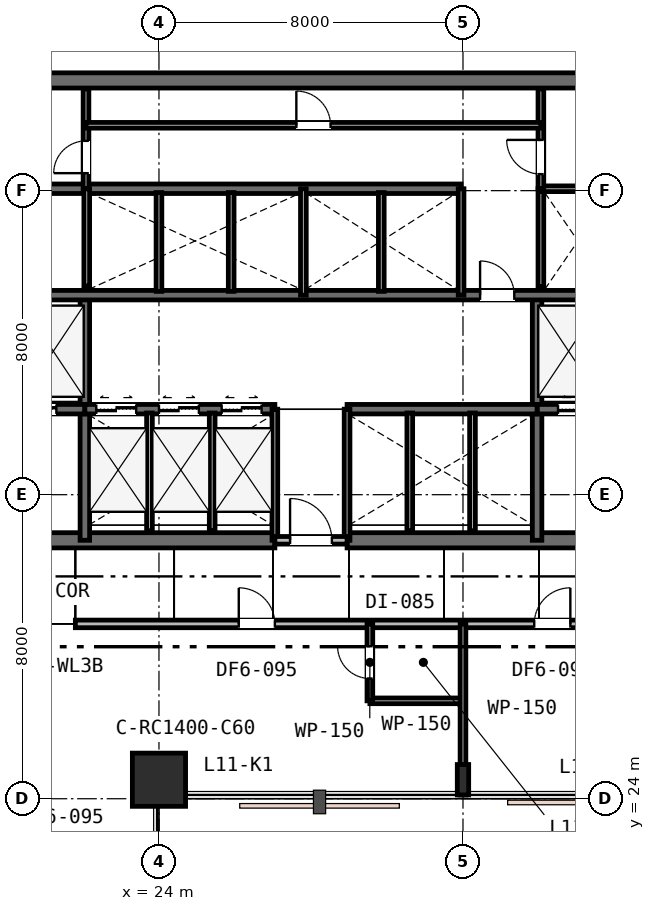
"""IFC4 building model, lengths in metres.
Left out: names, types, materials, properties, quantities, classifications, styles, units other than length and angle.
Written with IfcOpenShell. Run it as: python <this file> out.ifc"""

import sys

from ifc_helpers import new_model, si_unit, direction, frame, frame_2d, origin, origin_2d, place, context, subcontext, project, spatial, rectangle, i_section, extrude, element, fill, save


model = new_model("IFC4")
c1 = context("Model", 3, precision=1e-05, world=origin(), true_north=direction((0.0, 1.0)))
c2 = subcontext(c1, "Body", "Model", "MODEL_VIEW")
j1 = project(units=[si_unit("LENGTHUNIT", "METRE"), si_unit("PLANEANGLEUNIT", "RADIAN")], contexts=[c1])
p1 = place(None, origin())
s1 = spatial("IfcSite", under=j1, at=p1, CompositionType="ELEMENT")
p2 = place(p1, origin())
s2 = spatial("IfcBuilding", under=s1, at=p2, CompositionType="ELEMENT")
p3 = place(p2, frame((0.0, 0.0, 47.4)))
s3 = spatial("IfcBuildingStorey", under=s2, at=p3, CompositionType="ELEMENT", Elevation=47.4)
p4 = place(p3, frame((15.85, 42.9, 0.0), z_axis=(0.0, 0.0, 1.0), x_axis=(1.0, 0.0, 0.0)))
e1 = element("IfcWall", 1, at=p4, inside=s3, PredefinedType="SHEAR", context=c2, shape_type="SweptSolid", body=[
    extrude(rectangle(XDim=24.3, YDim=0.4, at=frame_2d((12.15, 0.0))), origin(), (0.0, 0.0, 1.0), 3.6),
])
p5 = place(p3, frame((15.85, 30.8, 0.0), z_axis=(0.0, 0.0, 1.0), x_axis=(1.0, 0.0, 0.0)))
e2 = element("IfcWall", 2, at=p5, inside=s3, PredefinedType="SHEAR", context=c2, shape_type="SweptSolid", body=[
    extrude(rectangle(XDim=11.2, YDim=0.4, at=frame_2d((5.6, 0.0))), origin(), (0.0, 0.0, 1.0), 3.6),
])
p6 = place(p5, frame((2.45, 0.0, 0.0)))
e3 = element("IfcOpeningElement", 3, at=p6, cuts=e2, PredefinedType="OPENING", context=c2, shape_type="SweptSolid", body=[
    extrude(rectangle(XDim=1.1, YDim=2.15, at=frame_2d((0.55, 1.075))), frame((0.0, 0.21, 0.0), z_axis=(0.0, -1.0, 0.0), x_axis=(1.0, 0.0, 0.0)), (0.0, 0.0, 1.0), 0.42),
])
p7 = place(p3, frame((28.95, 30.8, 0.0), z_axis=(0.0, 0.0, 1.0), x_axis=(1.0, 0.0, 0.0)))
e4 = element("IfcWall", 4, at=p7, inside=s3, PredefinedType="SHEAR", context=c2, shape_type="SweptSolid", body=[
    extrude(rectangle(XDim=11.2, YDim=0.4, at=frame_2d((5.6, 0.0))), origin(), (0.0, 0.0, 1.0), 3.6),
])
p8 = place(p7, frame((7.65, 0.0, 0.0)))
e5 = element("IfcOpeningElement", 5, at=p8, cuts=e4, PredefinedType="OPENING", context=c2, shape_type="SweptSolid", body=[
    extrude(rectangle(XDim=1.1, YDim=2.15, at=frame_2d((0.55, 1.075))), frame((0.0, 0.21, 0.0), z_axis=(0.0, -1.0, 0.0), x_axis=(1.0, 0.0, 0.0)), (0.0, 0.0, 1.0), 0.42),
])
for number, where, z_axis, x_axis in (
    (6, (22.05, 30.8, 0.0), (0.0, 0.0, 1.0), (0.0, 1.0, 0.0)),
    (7, (33.95, 30.8, 0.0), (0.0, 0.0, 1.0), (0.0, 1.0, 0.0)),
):
    element("IfcWall", number, at=place(p3, frame(where, z_axis=z_axis, x_axis=x_axis)), inside=s3, PredefinedType="SHEAR", context=c2, shape_type="SweptSolid", body=[
        extrude(rectangle(XDim=6.45, YDim=0.25, at=frame_2d((3.225, 0.0))), origin(), (0.0, 0.0, 1.0), 3.6),
    ])
p9 = place(p3, frame((16.0, 34.25, 0.0), z_axis=(0.0, 0.0, 1.0), x_axis=(1.0, 0.0, 0.0)))
e8 = element("IfcWall", 8, at=p9, inside=s3, PredefinedType="SHEAR", context=c2, shape_type="SweptSolid", body=[
    extrude(rectangle(XDim=6.05, YDim=0.25, at=frame_2d((3.025, 0.0))), origin(), (0.0, 0.0, 1.0), 3.6),
])
p10 = place(p9, frame((1.25, 0.0, 0.0)))
e9 = element("IfcOpeningElement", 9, at=p10, cuts=e8, PredefinedType="OPENING", context=c2, shape_type="SweptSolid", body=[
    extrude(rectangle(XDim=1.0, YDim=2.15, at=frame_2d((0.5, 1.075))), frame((0.0, 0.135, 0.0), z_axis=(0.0, -1.0, 0.0), x_axis=(1.0, 0.0, 0.0)), (0.0, 0.0, 1.0), 0.27),
])
p11 = place(p9, frame((4.2, 0.0, 0.0)))
e10 = element("IfcOpeningElement", 10, at=p11, cuts=e8, PredefinedType="OPENING", context=c2, shape_type="SweptSolid", body=[
    extrude(rectangle(XDim=1.1, YDim=2.15, at=frame_2d((0.55, 1.075))), frame((0.0, 0.135, 0.0), z_axis=(0.0, -1.0, 0.0), x_axis=(1.0, 0.0, 0.0)), (0.0, 0.0, 1.0), 0.27),
])
p12 = place(p3, frame((33.95, 34.25, 0.0), z_axis=(0.0, 0.0, 1.0), x_axis=(1.0, 0.0, 0.0)))
e11 = element("IfcWall", 11, at=p12, inside=s3, PredefinedType="SHEAR", context=c2, shape_type="SweptSolid", body=[
    extrude(rectangle(XDim=6.05, YDim=0.25, at=frame_2d((3.025, 0.0))), origin(), (0.0, 0.0, 1.0), 3.6),
])
p13 = place(p12, frame((3.7, 0.0, 0.0)))
e12 = element("IfcOpeningElement", 12, at=p13, cuts=e11, PredefinedType="OPENING", context=c2, shape_type="SweptSolid", body=[
    extrude(rectangle(XDim=1.0, YDim=2.15, at=frame_2d((0.5, 1.075))), frame((0.0, 0.135, 0.0), z_axis=(0.0, -1.0, 0.0), x_axis=(1.0, 0.0, 0.0)), (0.0, 0.0, 1.0), 0.27),
])
p14 = place(p12, frame((0.55, 0.0, 0.0)))
e13 = element("IfcOpeningElement", 13, at=p14, cuts=e11, PredefinedType="OPENING", context=c2, shape_type="SweptSolid", body=[
    extrude(rectangle(XDim=1.1, YDim=2.15, at=frame_2d((0.55, 1.075))), frame((0.0, 0.135, 0.0), z_axis=(0.0, -1.0, 0.0), x_axis=(1.0, 0.0, 0.0)), (0.0, 0.0, 1.0), 0.27),
])
p15 = place(p3, frame((22.05, 34.25, 0.0), z_axis=(0.0, 0.0, 1.0), x_axis=(1.0, 0.0, 0.0)))
e14 = element("IfcWall", 14, at=p15, inside=s3, PredefinedType="SHEAR", context=c2, shape_type="SweptSolid", body=[
    extrude(rectangle(XDim=5.0, YDim=0.25, at=frame_2d((2.5, 0.0))), origin(), (0.0, 0.0, 1.0), 3.6),
])
p16 = place(p15, frame((0.3, 0.0, 0.0)))
e15 = element("IfcOpeningElement", 15, at=p16, cuts=e14, PredefinedType="OPENING", context=c2, shape_type="SweptSolid", body=[
    extrude(rectangle(XDim=1.05, YDim=2.15, at=frame_2d((0.525, 1.075))), frame((0.0, 0.135, 0.0), z_axis=(0.0, -1.0, 0.0), x_axis=(1.0, 0.0, 0.0)), (0.0, 0.0, 1.0), 0.27),
])
p17 = place(p15, frame((1.95, 0.0, 0.0)))
e16 = element("IfcOpeningElement", 16, at=p17, cuts=e14, PredefinedType="OPENING", context=c2, shape_type="SweptSolid", body=[
    extrude(rectangle(XDim=1.05, YDim=2.15, at=frame_2d((0.525, 1.075))), frame((0.0, 0.135, 0.0), z_axis=(0.0, -1.0, 0.0), x_axis=(1.0, 0.0, 0.0)), (0.0, 0.0, 1.0), 0.27),
])
p18 = place(p15, frame((3.6, 0.0, 0.0)))
e17 = element("IfcOpeningElement", 17, at=p18, cuts=e14, PredefinedType="OPENING", context=c2, shape_type="SweptSolid", body=[
    extrude(rectangle(XDim=1.05, YDim=2.15, at=frame_2d((0.525, 1.075))), frame((0.0, 0.135, 0.0), z_axis=(0.0, -1.0, 0.0), x_axis=(1.0, 0.0, 0.0)), (0.0, 0.0, 1.0), 0.27),
])
p19 = place(p3, frame((28.95, 34.25, 0.0), z_axis=(0.0, 0.0, 1.0), x_axis=(1.0, 0.0, 0.0)))
e18 = element("IfcWall", 18, at=p19, inside=s3, PredefinedType="SHEAR", context=c2, shape_type="SweptSolid", body=[
    extrude(rectangle(XDim=5.0, YDim=0.25, at=frame_2d((2.5, 0.0))), origin(), (0.0, 0.0, 1.0), 3.6),
])
p20 = place(p3, frame((19.9, 37.25, 0.0), z_axis=(0.0, 0.0, 1.0), x_axis=(1.0, 0.0, 0.0)))
e19 = element("IfcWall", 19, at=p20, inside=s3, PredefinedType="SHEAR", context=c2, shape_type="SweptSolid", body=[
    extrude(rectangle(XDim=16.2, YDim=0.25, at=frame_2d((8.1, 0.0))), origin(), (0.0, 0.0, 1.0), 3.6),
])
p21 = place(p20, frame((12.55, 0.0, 0.0)))
e20 = element("IfcOpeningElement", 20, at=p21, cuts=e19, PredefinedType="OPENING", context=c2, shape_type="SweptSolid", body=[
    extrude(rectangle(XDim=0.9, YDim=2.15, at=frame_2d((0.45, 1.075))), frame((0.0, 0.135, 0.0), z_axis=(0.0, -1.0, 0.0), x_axis=(1.0, 0.0, 0.0)), (0.0, 0.0, 1.0), 0.27),
])
p22 = place(p3, frame((19.9, 40.05, 0.0), z_axis=(0.0, 0.0, 1.0), x_axis=(1.0, 0.0, 0.0)))
e21 = element("IfcWall", 21, at=p22, inside=s3, PredefinedType="SHEAR", context=c2, shape_type="SweptSolid", body=[
    extrude(rectangle(XDim=12.05, YDim=0.25, at=frame_2d((6.025, 0.0))), origin(), (0.0, 0.0, 1.0), 3.6),
])
p23 = place(p3, frame((24.0, 24.5, 0.0), z_axis=(0.0, 0.0, 1.0), x_axis=(1.0, 0.0, 0.0)))
e22 = element("IfcColumn", 22, at=p23, inside=s3, PredefinedType="COLUMN", context=c2, shape_type="SweptSolid", body=[
    extrude(rectangle(XDim=1.4, YDim=1.4, at=origin_2d()), origin(), (0.0, 0.0, 1.0), 3.6),
])
p24 = place(p3, frame((32.0, 24.5, 0.0), z_axis=(0.0, 0.0, 1.0), x_axis=(1.0, 0.0, 0.0)))
e23 = element("IfcColumn", 23, at=p24, inside=s3, PredefinedType="COLUMN", context=c2, shape_type="SweptSolid", body=[
    extrude(i_section(OverallWidth=0.3, OverallDepth=0.8, WebThickness=0.018, FlangeThickness=0.033, FilletRadius=0.03, at=origin_2d()), origin(), (0.0, 0.0, 1.0), 3.6),
])
for number, where, z_axis, x_axis in (
    (24, (27.05, 30.8, 0.0), (0.0, 0.0, 1.0), (0.0, 1.0, 0.0)),
    (25, (28.95, 30.8, 0.0), (0.0, 0.0, 1.0), (0.0, 1.0, 0.0)),
):
    element("IfcWall", number, at=place(p3, frame(where, z_axis=z_axis, x_axis=x_axis)), inside=s3, PredefinedType="PLUMBINGWALL", context=c2, shape_type="SweptSolid", body=[
        extrude(rectangle(XDim=3.45, YDim=0.15, at=frame_2d((1.725, 0.0))), origin(), (0.0, 0.0, 1.0), 3.33),
    ])
p25 = place(p3, frame((27.05, 30.8, 0.0), z_axis=(0.0, 0.0, 1.0), x_axis=(1.0, 0.0, 0.0)))
e26 = element("IfcWall", 26, at=p25, inside=s3, PredefinedType="PARTITIONING", context=c2, shape_type="SweptSolid", body=[
    extrude(rectangle(XDim=1.9, YDim=0.2, at=frame_2d((0.95, 0.0))), origin(), (0.0, 0.0, 1.0), 3.33),
])
p26 = place(p25, frame((0.4, 0.0, 0.0)))
e27 = element("IfcOpeningElement", 27, at=p26, cuts=e26, PredefinedType="OPENING", context=c2, shape_type="SweptSolid", body=[
    extrude(rectangle(XDim=1.1, YDim=2.15, at=frame_2d((0.55, 1.075))), frame((0.0, 0.11, 0.0), z_axis=(0.0, -1.0, 0.0), x_axis=(1.0, 0.0, 0.0)), (0.0, 0.0, 1.0), 0.22),
])
for number, where, z_axis, x_axis in (
    (28, (23.75, 31.05, 0.0), (0.0, 0.0, 1.0), (0.0, 1.0, 0.0)),
    (29, (25.4, 31.05, 0.0), (0.0, 0.0, 1.0), (0.0, 1.0, 0.0)),
    (30, (30.6, 31.05, 0.0), (0.0, 0.0, 1.0), (0.0, 1.0, 0.0)),
    (31, (32.25, 31.05, 0.0), (0.0, 0.0, 1.0), (0.0, 1.0, 0.0)),
):
    element("IfcWall", number, at=place(p3, frame(where, z_axis=z_axis, x_axis=x_axis)), inside=s3, PredefinedType="PLUMBINGWALL", context=c2, shape_type="SweptSolid", body=[
        extrude(rectangle(XDim=3.1, YDim=0.15, at=frame_2d((1.55, 0.0))), origin(), (0.0, 0.0, 1.0), 3.33),
    ])
p27 = place(p3, frame((22.1, 37.49, 0.0), z_axis=(0.0, 0.0, 1.0), x_axis=(0.0, 1.0, 0.0)))
e32 = element("IfcWall", 32, at=p27, inside=s3, PredefinedType="PLUMBINGWALL", context=c2, shape_type="SweptSolid", body=[
    extrude(rectangle(XDim=2.56, YDim=0.15, at=frame_2d((1.28, 0.0))), origin(), (0.0, 0.0, 1.0), 3.33),
])
p28 = place(p3, frame((27.8, 37.25, 0.0), z_axis=(0.0, 0.0, 1.0), x_axis=(0.0, 1.0, 0.0)))
e33 = element("IfcWall", 33, at=p28, inside=s3, PredefinedType="PLUMBINGWALL", context=c2, shape_type="SweptSolid", body=[
    extrude(rectangle(XDim=2.8, YDim=0.15, at=frame_2d((1.4, 0.0))), origin(), (0.0, 0.0, 1.0), 3.33),
])
for number, where, z_axis, x_axis in (
    (34, (24.0, 37.35, 0.0), (0.0, 0.0, 1.0), (0.0, 1.0, 0.0)),
    (35, (25.9, 37.35, 0.0), (0.0, 0.0, 1.0), (0.0, 1.0, 0.0)),
):
    element("IfcWall", number, at=place(p3, frame(where, z_axis=z_axis, x_axis=x_axis)), inside=s3, PredefinedType="PLUMBINGWALL", context=c2, shape_type="SweptSolid", body=[
        extrude(rectangle(XDim=2.6, YDim=0.15, at=frame_2d((1.3, 0.0))), origin(), (0.0, 0.0, 1.0), 3.33),
    ])
p29 = place(p3, frame((31.95, 37.25, 0.0), z_axis=(0.0, 0.0, 1.0), x_axis=(0.0, 1.0, 0.0)))
e36 = element("IfcWall", 36, at=p29, inside=s3, PredefinedType="PLUMBINGWALL", context=c2, shape_type="SweptSolid", body=[
    extrude(rectangle(XDim=2.8, YDim=0.15, at=frame_2d((1.4, 0.0))), origin(), (0.0, 0.0, 1.0), 3.33),
])
p30 = place(p3, frame((29.85, 37.35, 0.0), z_axis=(0.0, 0.0, 1.0), x_axis=(0.0, 1.0, 0.0)))
e37 = element("IfcWall", 37, at=p30, inside=s3, PredefinedType="PLUMBINGWALL", context=c2, shape_type="SweptSolid", body=[
    extrude(rectangle(XDim=2.6, YDim=0.15, at=frame_2d((1.3, 0.0))), origin(), (0.0, 0.0, 1.0), 3.33),
])
p31 = place(p3, frame((34.05, 37.473, 0.0), z_axis=(0.0, 0.0, 1.0), x_axis=(0.0, 1.0, 0.0)))
e38 = element("IfcWall", 38, at=p31, inside=s3, PredefinedType="PLUMBINGWALL", context=c2, shape_type="SweptSolid", body=[
    extrude(rectangle(XDim=2.577, YDim=0.15, at=frame_2d((1.288, 0.0))), origin(), (0.0, 0.0, 1.0), 3.33),
])
p32 = place(p3, frame((34.05, 40.05, 0.0), z_axis=(0.0, 0.0, 1.0), x_axis=(1.0, 0.0, 0.0)))
e39 = element("IfcWall", 39, at=p32, inside=s3, PredefinedType="PARTITIONING", context=c2, shape_type="SweptSolid", body=[
    extrude(rectangle(XDim=2.05, YDim=0.15, at=frame_2d((1.025, 0.0))), origin(), (0.0, 0.0, 1.0), 3.33),
])
p33 = place(p3, frame((34.05, 40.05, 0.0), z_axis=(0.0, 0.0, 1.0), x_axis=(0.0, 1.0, 0.0)))
e40 = element("IfcWall", 40, at=p33, inside=s3, PredefinedType="PARTITIONING", context=c2, shape_type="SweptSolid", body=[
    extrude(rectangle(XDim=2.63, YDim=0.15, at=frame_2d((1.315, 0.0))), origin(), (0.0, 0.0, 1.0), 3.33),
])
p34 = place(p33, frame((0.385, 0.0, 0.0)))
e41 = element("IfcOpeningElement", 41, at=p34, cuts=e40, PredefinedType="OPENING", context=c2, shape_type="SweptSolid", body=[
    extrude(rectangle(XDim=0.9, YDim=2.15, at=frame_2d((0.45, 1.075))), frame((0.0, 0.085, 0.0), z_axis=(0.0, -1.0, 0.0), x_axis=(1.0, 0.0, 0.0)), (0.0, 0.0, 1.0), 0.17),
])
p35 = place(p3, frame((22.08, 40.05, 0.0), z_axis=(0.0, 0.0, 1.0), x_axis=(0.0, 1.0, 0.0)))
e42 = element("IfcWall", 42, at=p35, inside=s3, PredefinedType="PARTITIONING", context=c2, shape_type="SweptSolid", body=[
    extrude(rectangle(XDim=2.63, YDim=0.15, at=frame_2d((1.315, 0.0))), origin(), (0.0, 0.0, 1.0), 3.33),
])
p36 = place(p35, frame((0.41, 0.0, 0.0)))
e43 = element("IfcOpeningElement", 43, at=p36, cuts=e42, PredefinedType="OPENING", context=c2, shape_type="SweptSolid", body=[
    extrude(rectangle(XDim=0.85, YDim=2.15, at=frame_2d((0.425, 1.075))), frame((0.0, 0.085, 0.0), z_axis=(0.0, -1.0, 0.0), x_axis=(1.0, 0.0, 0.0)), (0.0, 0.0, 1.0), 0.17),
])
p37 = place(p3, frame((22.08, 41.72, 0.0), z_axis=(0.0, 0.0, 1.0), x_axis=(1.0, 0.0, 0.0)))
e44 = element("IfcWall", 44, at=p37, inside=s3, PredefinedType="PARTITIONING", context=c2, shape_type="SweptSolid", body=[
    extrude(rectangle(XDim=11.97, YDim=0.15, at=frame_2d((5.985, 0.0))), origin(), (0.0, 0.0, 1.0), 3.33),
])
p38 = place(p37, frame((5.535, 0.0, 0.0)))
e45 = element("IfcOpeningElement", 45, at=p38, cuts=e44, PredefinedType="OPENING", context=c2, shape_type="SweptSolid", body=[
    extrude(rectangle(XDim=0.9, YDim=2.15, at=frame_2d((0.45, 1.075))), frame((0.0, 0.085, 0.0), z_axis=(0.0, -1.0, 0.0), x_axis=(1.0, 0.0, 0.0)), (0.0, 0.0, 1.0), 0.17),
])
p39 = place(p3, frame((21.8, 28.6, 0.0), z_axis=(0.0, 0.0, 1.0), x_axis=(1.0, 0.0, 0.0)))
e46 = element("IfcWall", 46, at=p39, inside=s3, PredefinedType="PARTITIONING", context=c2, shape_type="SweptSolid", body=[
    extrude(rectangle(XDim=28.6, YDim=0.2, at=frame_2d((14.3, 0.0))), origin(), (0.0, 0.0, 1.0), 2.82),
])
p40 = place(p39, frame((4.3, 0.0, 0.0)))
e47 = element("IfcOpeningElement", 47, at=p40, cuts=e46, PredefinedType="OPENING", context=c2, shape_type="SweptSolid", body=[
    extrude(rectangle(XDim=0.95, YDim=2.15, at=frame_2d((0.475, 1.075))), frame((0.0, 0.11, 0.0), z_axis=(0.0, -1.0, 0.0), x_axis=(1.0, 0.0, 0.0)), (0.0, 0.0, 1.0), 0.22),
])
p41 = place(p39, frame((12.075, 0.0, 0.0)))
e48 = element("IfcOpeningElement", 48, at=p41, cuts=e46, PredefinedType="OPENING", context=c2, shape_type="SweptSolid", body=[
    extrude(rectangle(XDim=0.95, YDim=2.15, at=frame_2d((0.475, 1.075))), frame((0.0, 0.11, 0.0), z_axis=(0.0, -1.0, 0.0), x_axis=(1.0, 0.0, 0.0)), (0.0, 0.0, 1.0), 0.22),
])
p42 = place(p39, frame((20.186, 0.0, 0.0)))
e49 = element("IfcOpeningElement", 49, at=p42, cuts=e46, PredefinedType="OPENING", context=c2, shape_type="SweptSolid", body=[
    extrude(rectangle(XDim=0.95, YDim=2.15, at=frame_2d((0.475, 1.075))), frame((0.0, 0.11, 0.0), z_axis=(0.0, -1.0, 0.0), x_axis=(1.0, 0.0, 0.0)), (0.0, 0.0, 1.0), 0.22),
])
p43 = place(p3, frame((29.55, 26.576, 0.0), z_axis=(0.0, 0.0, 1.0), x_axis=(1.0, 0.0, 0.0)))
e50 = element("IfcWall", 50, at=p43, inside=s3, PredefinedType="PARTITIONING", context=c2, shape_type="SweptSolid", body=[
    extrude(rectangle(XDim=2.45, YDim=0.15, at=frame_2d((1.225, 0.0))), origin(), (0.0, 0.0, 1.0), 3.33),
])
p44 = place(p3, frame((29.55, 26.576, 0.0), z_axis=(0.0, 0.0, 1.0), x_axis=(0.0, 1.0, 0.0)))
e51 = element("IfcWall", 51, at=p44, inside=s3, PredefinedType="PARTITIONING", context=c2, shape_type="SweptSolid", body=[
    extrude(rectangle(XDim=2.024, YDim=0.15, at=frame_2d((1.012, 0.0))), origin(), (0.0, 0.0, 1.0), 3.33),
])
p45 = place(p44, frame((0.587, 0.0, 0.0)))
e52 = element("IfcOpeningElement", 52, at=p45, cuts=e51, PredefinedType="OPENING", context=c2, shape_type="SweptSolid", body=[
    extrude(rectangle(XDim=0.85, YDim=2.15, at=frame_2d((0.425, 1.075))), frame((0.0, 0.085, 0.0), z_axis=(0.0, -1.0, 0.0), x_axis=(1.0, 0.0, 0.0)), (0.0, 0.0, 1.0), 0.17),
])
p46 = place(p3, frame((32.0, 28.6, 0.0), z_axis=(0.0, 0.0, 1.0), x_axis=(0.0, -1.0, 0.0)))
e53 = element("IfcWall", 53, at=p46, inside=s3, PredefinedType="PARTITIONING", context=c2, shape_type="SweptSolid", body=[
    extrude(rectangle(XDim=4.5, YDim=0.15, at=frame_2d((2.25, 0.0))), origin(), (0.0, 0.0, 1.0), 2.93),
])
p47 = place(p26, origin())
e54 = element("IfcDoor", 54, at=p47, inside=s3, OperationType="SINGLE_SWING_LEFT", PredefinedType="DOOR", context=c2, shape_type="SweptSolid", body=[
    extrude(rectangle(XDim=1.1, YDim=2.15, at=frame_2d((0.55, 1.075))), frame((0.0, 0.025, 0.0), z_axis=(0.0, -1.0, 0.0), x_axis=(1.0, 0.0, 0.0)), (0.0, 0.0, 1.0), 0.05),
])
fill(e27, e54)
p48 = place(p21, origin())
e55 = element("IfcDoor", 55, at=p48, inside=s3, OperationType="SINGLE_SWING_LEFT", PredefinedType="DOOR", context=c2, shape_type="SweptSolid", body=[
    extrude(rectangle(XDim=0.9, YDim=2.15, at=frame_2d((0.45, 1.075))), frame((0.0, 0.025, 0.0), z_axis=(0.0, -1.0, 0.0), x_axis=(1.0, 0.0, 0.0)), (0.0, 0.0, 1.0), 0.05),
])
fill(e20, e55)
p49 = place(p34, origin())
e56 = element("IfcDoor", 56, at=p49, inside=s3, OperationType="SINGLE_SWING_RIGHT", PredefinedType="DOOR", context=c2, shape_type="SweptSolid", body=[
    extrude(rectangle(XDim=0.9, YDim=2.15, at=frame_2d((0.45, 1.075))), frame((0.0, 0.025, 0.0), z_axis=(0.0, -1.0, 0.0), x_axis=(1.0, 0.0, 0.0)), (0.0, 0.0, 1.0), 0.05),
])
fill(e41, e56)
p50 = place(p36, origin())
e57 = element("IfcDoor", 57, at=p50, inside=s3, OperationType="SINGLE_SWING_LEFT", PredefinedType="DOOR", context=c2, shape_type="SweptSolid", body=[
    extrude(rectangle(XDim=0.85, YDim=2.15, at=frame_2d((0.425, 1.075))), frame((0.0, 0.025, 0.0), z_axis=(0.0, -1.0, 0.0), x_axis=(1.0, 0.0, 0.0)), (0.0, 0.0, 1.0), 0.05),
])
fill(e43, e57)
p51 = place(p38, origin())
e58 = element("IfcDoor", 58, at=p51, inside=s3, OperationType="SINGLE_SWING_LEFT", PredefinedType="DOOR", context=c2, shape_type="SweptSolid", body=[
    extrude(rectangle(XDim=0.9, YDim=2.15, at=frame_2d((0.45, 1.075))), frame((0.0, 0.025, 0.0), z_axis=(0.0, -1.0, 0.0), x_axis=(1.0, 0.0, 0.0)), (0.0, 0.0, 1.0), 0.05),
])
fill(e45, e58)
p52 = place(p40, origin())
e59 = element("IfcDoor", 59, at=p52, inside=s3, OperationType="SINGLE_SWING_LEFT", PredefinedType="DOOR", context=c2, shape_type="SweptSolid", body=[
    extrude(rectangle(XDim=0.95, YDim=2.15, at=frame_2d((0.475, 1.075))), frame((0.0, 0.025, 0.0), z_axis=(0.0, -1.0, 0.0), x_axis=(1.0, 0.0, 0.0)), (0.0, 0.0, 1.0), 0.05),
])
fill(e47, e59)
p53 = place(p45, origin())
e60 = element("IfcDoor", 60, at=p53, inside=s3, OperationType="SINGLE_SWING_RIGHT", PredefinedType="DOOR", context=c2, shape_type="SweptSolid", body=[
    extrude(rectangle(XDim=0.85, YDim=2.15, at=frame_2d((0.425, 1.075))), frame((0.0, 0.025, 0.0), z_axis=(0.0, -1.0, 0.0), x_axis=(1.0, 0.0, 0.0)), (0.0, 0.0, 1.0), 0.05),
])
fill(e52, e60)
p54 = place(p41, origin())
e61 = element("IfcDoor", 61, at=p54, inside=s3, OperationType="SINGLE_SWING_RIGHT", PredefinedType="DOOR", context=c2, shape_type="SweptSolid", body=[
    extrude(rectangle(XDim=0.95, YDim=2.15, at=frame_2d((0.475, 1.075))), frame((0.0, 0.025, 0.0), z_axis=(0.0, -1.0, 0.0), x_axis=(1.0, 0.0, 0.0)), (0.0, 0.0, 1.0), 0.05),
])
fill(e48, e61)
p55 = place(p11, origin())
e62 = element("IfcDoor", 62, at=p55, inside=s3, OperationType="DOUBLE_DOOR_SLIDING", PredefinedType="DOOR", context=c2, shape_type="SweptSolid", body=[
    extrude(rectangle(XDim=1.1, YDim=2.15, at=frame_2d((0.55, 1.075))), frame((0.0, 0.025, 0.0), z_axis=(0.0, -1.0, 0.0), x_axis=(1.0, 0.0, 0.0)), (0.0, 0.0, 1.0), 0.05),
])
fill(e10, e62)
p56 = place(p14, origin())
e63 = element("IfcDoor", 63, at=p56, inside=s3, OperationType="DOUBLE_DOOR_SLIDING", PredefinedType="DOOR", context=c2, shape_type="SweptSolid", body=[
    extrude(rectangle(XDim=1.1, YDim=2.15, at=frame_2d((0.55, 1.075))), frame((0.0, 0.025, 0.0), z_axis=(0.0, -1.0, 0.0), x_axis=(1.0, 0.0, 0.0)), (0.0, 0.0, 1.0), 0.05),
])
fill(e13, e63)
p57 = place(p16, origin())
e64 = element("IfcDoor", 64, at=p57, inside=s3, OperationType="DOUBLE_DOOR_SLIDING", PredefinedType="DOOR", context=c2, shape_type="SweptSolid", body=[
    extrude(rectangle(XDim=1.05, YDim=2.15, at=frame_2d((0.525, 1.075))), frame((0.0, 0.025, 0.0), z_axis=(0.0, -1.0, 0.0), x_axis=(1.0, 0.0, 0.0)), (0.0, 0.0, 1.0), 0.05),
])
fill(e15, e64)
p58 = place(p17, origin())
e65 = element("IfcDoor", 65, at=p58, inside=s3, OperationType="DOUBLE_DOOR_SLIDING", PredefinedType="DOOR", context=c2, shape_type="SweptSolid", body=[
    extrude(rectangle(XDim=1.05, YDim=2.15, at=frame_2d((0.525, 1.075))), frame((0.0, 0.025, 0.0), z_axis=(0.0, -1.0, 0.0), x_axis=(1.0, 0.0, 0.0)), (0.0, 0.0, 1.0), 0.05),
])
fill(e16, e65)
p59 = place(p18, origin())
e66 = element("IfcDoor", 66, at=p59, inside=s3, OperationType="DOUBLE_DOOR_SLIDING", PredefinedType="DOOR", context=c2, shape_type="SweptSolid", body=[
    extrude(rectangle(XDim=1.05, YDim=2.15, at=frame_2d((0.525, 1.075))), frame((0.0, 0.025, 0.0), z_axis=(0.0, -1.0, 0.0), x_axis=(1.0, 0.0, 0.0)), (0.0, 0.0, 1.0), 0.05),
])
fill(e17, e66)
save(model, sys.argv[1])
